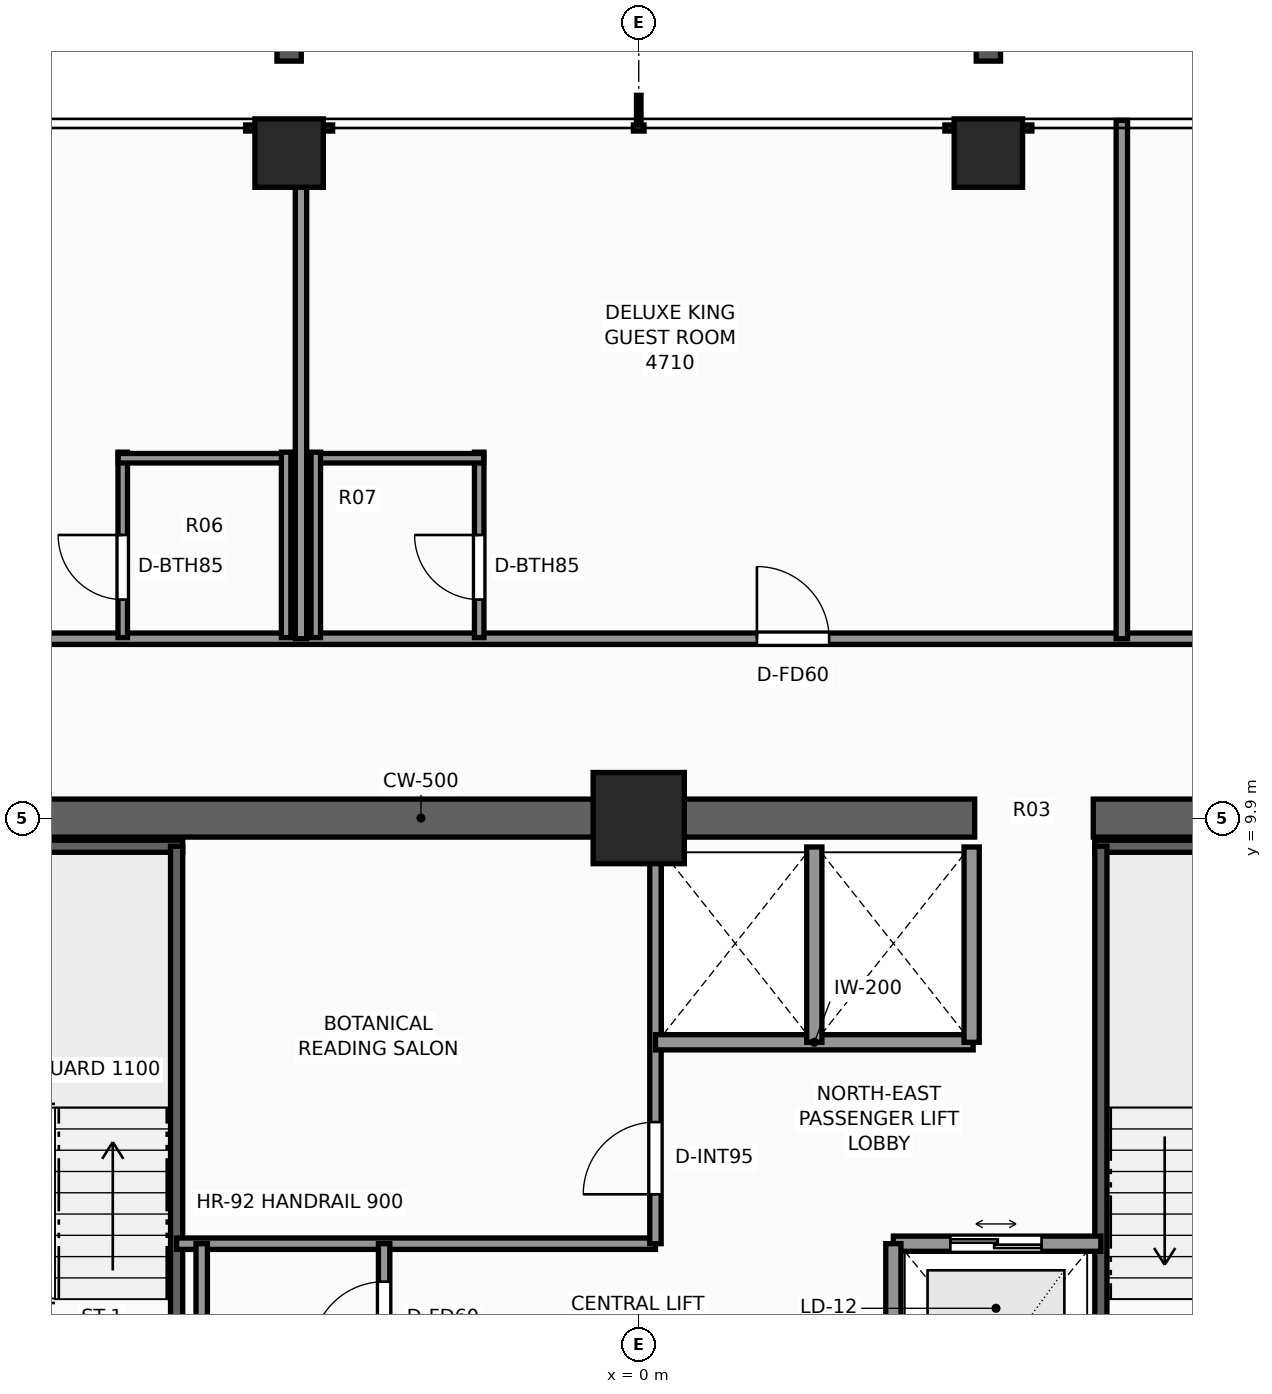
"""IFC4 building model, lengths in metres.
Left out: names, types, materials, properties, quantities, classifications, styles, units other than length and angle.
Written with IfcOpenShell. Run it as: python <this file> out.ifc"""

import sys

from ifc_helpers import new_model, si_unit, direction, frame, frame_2d, origin, origin_2d, place, context, subcontext, project, spatial, rectangle, extrude, element, fill, save


model = new_model("IFC4")
c1 = context("Model", 3, precision=1e-05, world=origin(), true_north=direction((0.0, 1.0)))
c2 = subcontext(c1, "Body", "Model", "MODEL_VIEW")
j1 = project(units=[si_unit("LENGTHUNIT", "METRE"), si_unit("PLANEANGLEUNIT", "RADIAN")], contexts=[c1])
p1 = place(None, origin())
s1 = spatial("IfcSite", under=j1, at=p1, CompositionType="ELEMENT")
p2 = place(p1, origin())
s2 = spatial("IfcBuilding", under=s1, at=p2, CompositionType="ELEMENT")
p3 = place(p2, frame((0.0, 0.0, 163.5)))
s3 = spatial("IfcBuildingStorey", under=s2, at=p3, CompositionType="ELEMENT", Elevation=163.5)
p4 = place(p3, frame((-10.15, 9.9, 0.0), z_axis=(0.0, 0.0, 1.0), x_axis=(1.0, 0.0, 0.0)))
e1 = element("IfcWall", 1, at=p4, inside=s3, PredefinedType="SHEAR", context=c2, shape_type="SweptSolid", body=[
    extrude(rectangle(XDim=14.57, YDim=0.5, at=frame_2d((7.285, 0.0))), origin(), (0.0, 0.0, 1.0), 3.3),
])
p5 = place(p3, frame((5.98, 9.9, 0.0), z_axis=(0.0, 0.0, 1.0), x_axis=(1.0, 0.0, 0.0)))
e2 = element("IfcWall", 2, at=p5, inside=s3, PredefinedType="SHEAR", context=c2, shape_type="SweptSolid", body=[
    extrude(rectangle(XDim=4.17, YDim=0.5, at=frame_2d((2.085, 0.0))), origin(), (0.0, 0.0, 1.0), 3.3),
])
p6 = place(p3, frame((0.0, 9.9, 0.0), z_axis=(0.0, 0.0, 1.0), x_axis=(1.0, 0.0, 0.0)))
e3 = element("IfcColumn", 3, at=p6, inside=s3, PredefinedType="COLUMN", context=c2, shape_type="SweptSolid", body=[
    extrude(rectangle(XDim=1.2, YDim=1.2, at=origin_2d()), origin(), (0.0, 0.0, 1.0), 3.3),
])
for number, where, z_axis, x_axis in (
    (4, (-4.6, 18.65, 0.0), (0.0, 0.0, 1.0), (1.0, 0.0, 0.0)),
    (5, (4.6, 18.65, 0.0), (0.0, 0.0, 1.0), (1.0, 0.0, 0.0)),
):
    element("IfcColumn", number, at=place(p3, frame(where, z_axis=z_axis, x_axis=x_axis)), inside=s3, PredefinedType="COLUMN", context=c2, shape_type="SweptSolid", body=[
        extrude(rectangle(XDim=0.9, YDim=0.9, at=origin_2d()), origin(), (0.0, 0.0, 1.0), 3.3),
    ])
p7 = place(p3, frame((-9.52, 9.53, 0.0), z_axis=(0.0, 0.0, 1.0), x_axis=(1.0, 0.0, 0.0)))
e6 = element("IfcWall", 6, at=p7, inside=s3, PredefinedType="SHEAR", context=c2, shape_type="SweptSolid", body=[
    extrude(rectangle(XDim=3.52, YDim=0.16, at=frame_2d((1.76, 0.0))), origin(), (0.0, 0.0, 1.0), 3.3),
])
p8 = place(p3, frame((-6.08, 1.97, 0.0), z_axis=(0.0, 0.0, 1.0), x_axis=(0.0, 1.0, 0.0)))
e7 = element("IfcWall", 7, at=p8, inside=s3, PredefinedType="SHEAR", context=c2, shape_type="SweptSolid", body=[
    extrude(rectangle(XDim=7.56, YDim=0.16, at=frame_2d((3.78, 0.0))), origin(), (0.0, 0.0, 1.0), 3.3),
])
p9 = place(p3, frame((6.0, 9.53, 0.0), z_axis=(0.0, 0.0, 1.0), x_axis=(1.0, 0.0, 0.0)))
e8 = element("IfcWall", 8, at=p9, inside=s3, PredefinedType="SHEAR", context=c2, shape_type="SweptSolid", body=[
    extrude(rectangle(XDim=3.52, YDim=0.16, at=frame_2d((1.76, 0.0))), origin(), (0.0, 0.0, 1.0), 3.3),
])
p10 = place(p3, frame((6.08, 1.97, 0.0), z_axis=(0.0, 0.0, 1.0), x_axis=(0.0, 1.0, 0.0)))
e9 = element("IfcWall", 9, at=p10, inside=s3, PredefinedType="SHEAR", context=c2, shape_type="SweptSolid", body=[
    extrude(rectangle(XDim=7.56, YDim=0.16, at=frame_2d((3.78, 0.0))), origin(), (0.0, 0.0, 1.0), 3.3),
])
p11 = place(p3, frame((3.35, 4.3, 0.0), z_axis=(0.0, 0.0, 1.0), x_axis=(1.0, 0.0, 0.0)))
e10 = element("IfcWall", 10, at=p11, inside=s3, PredefinedType="SOLIDWALL", context=c2, shape_type="SweptSolid", body=[
    extrude(rectangle(XDim=2.73, YDim=0.2, at=frame_2d((1.365, 0.0))), origin(), (0.0, 0.0, 1.0), 3.1),
])
p12 = place(p11, frame((0.75, 0.0, 0.0)))
e11 = element("IfcOpeningElement", 11, at=p12, cuts=e10, PredefinedType="OPENING", context=c2, shape_type="SweptSolid", body=[
    extrude(rectangle(XDim=1.2, YDim=2.25, at=frame_2d((0.6, 1.125))), frame((0.0, 0.11, 0.0), z_axis=(0.0, -1.0, 0.0), x_axis=(1.0, 0.0, 0.0)), (0.0, 0.0, 1.0), 0.22),
])
p13 = place(p3, frame((3.35, 1.1, 0.0), z_axis=(0.0, 0.0, 1.0), x_axis=(0.0, 1.0, 0.0)))
e12 = element("IfcWall", 12, at=p13, inside=s3, PredefinedType="SOLIDWALL", context=c2, shape_type="SweptSolid", body=[
    extrude(rectangle(XDim=3.2, YDim=0.2, at=frame_2d((1.6, 0.0))), origin(), (0.0, 0.0, 1.0), 2.735),
])
p14 = place(p3, frame((-6.08, 4.3, 0.0), z_axis=(0.0, 0.0, 1.0), x_axis=(1.0, 0.0, 0.0)))
e13 = element("IfcWall", 13, at=p14, inside=s3, PredefinedType="PARTITIONING", context=c2, shape_type="SweptSolid", body=[
    extrude(rectangle(XDim=6.3, YDim=0.15, at=frame_2d((3.15, 0.0))), origin(), (0.0, 0.0, 1.0), 3.1),
])
p15 = place(p3, frame((0.22, 4.3, 0.0), z_axis=(0.0, 0.0, 1.0), x_axis=(0.0, 1.0, 0.0)))
e14 = element("IfcWall", 14, at=p15, inside=s3, PredefinedType="PARTITIONING", context=c2, shape_type="SweptSolid", body=[
    extrude(rectangle(XDim=5.22, YDim=0.15, at=frame_2d((2.61, 0.0))), origin(), (0.0, 0.0, 1.0), 3.1),
])
p16 = place(p15, frame((0.65, 0.0, 0.0)))
e15 = element("IfcOpeningElement", 15, at=p16, cuts=e14, PredefinedType="OPENING", context=c2, shape_type="SweptSolid", body=[
    extrude(rectangle(XDim=0.95, YDim=2.06, at=frame_2d((0.475, 1.03))), frame((0.0, 0.085, 0.0), z_axis=(0.0, -1.0, 0.0), x_axis=(1.0, 0.0, 0.0)), (0.0, 0.0, 1.0), 0.17),
])
p17 = place(p3, frame((0.22, 6.95, 0.0), z_axis=(0.0, 0.0, 1.0), x_axis=(1.0, 0.0, 0.0)))
e16 = element("IfcWall", 16, at=p17, inside=s3, PredefinedType="SOLIDWALL", context=c2, shape_type="SweptSolid", body=[
    extrude(rectangle(XDim=4.18, YDim=0.2, at=frame_2d((2.09, 0.0))), origin(), (0.0, 0.0, 1.0), 3.1),
])
for number, where, z_axis, x_axis in (
    (17, (4.38, 6.95, 0.0), (0.0, 0.0, 1.0), (0.0, 1.0, 0.0)),
    (18, (2.31, 6.95, 0.0), (0.0, 0.0, 1.0), (0.0, 1.0, 0.0)),
):
    element("IfcWall", number, at=place(p3, frame(where, z_axis=z_axis, x_axis=x_axis)), inside=s3, PredefinedType="SOLIDWALL", context=c2, shape_type="SweptSolid", body=[
        extrude(rectangle(XDim=2.57, YDim=0.2, at=frame_2d((1.285, 0.0))), origin(), (0.0, 0.0, 1.0), 3.1),
    ])
p18 = place(p3, frame((-3.35, 1.1, 0.0), z_axis=(0.0, 0.0, 1.0), x_axis=(0.0, 1.0, 0.0)))
e19 = element("IfcWall", 19, at=p18, inside=s3, PredefinedType="PARTITIONING", context=c2, shape_type="SweptSolid", body=[
    extrude(rectangle(XDim=3.2, YDim=0.15, at=frame_2d((1.6, 0.0))), origin(), (0.0, 0.0, 1.0), 2.735),
])
p19 = place(p18, frame((1.75, 0.0, 0.0)))
e20 = element("IfcOpeningElement", 20, at=p19, cuts=e19, PredefinedType="OPENING", context=c2, shape_type="SweptSolid", body=[
    extrude(rectangle(XDim=0.95, YDim=2.06, at=frame_2d((0.475, 1.03))), frame((0.0, 0.085, 0.0), z_axis=(0.0, -1.0, 0.0), x_axis=(1.0, 0.0, 0.0)), (0.0, 0.0, 1.0), 0.17),
])
p20 = place(p3, frame((-5.75, 1.97, 0.0), z_axis=(0.0, 0.0, 1.0), x_axis=(0.0, 1.0, 0.0)))
e21 = element("IfcWall", 21, at=p20, inside=s3, PredefinedType="PARTITIONING", context=c2, shape_type="SweptSolid", body=[
    extrude(rectangle(XDim=2.33, YDim=0.15, at=frame_2d((1.165, 0.0))), origin(), (0.0, 0.0, 1.0), 2.735),
])
p21 = place(p3, frame((-12.42, 12.26, 0.0), z_axis=(0.0, 0.0, 1.0), x_axis=(1.0, 0.0, 0.0)))
e22 = element("IfcWall", 22, at=p21, inside=s3, PredefinedType="PARTITIONING", context=c2, shape_type="SweptSolid", body=[
    extrude(rectangle(XDim=24.84, YDim=0.15, at=frame_2d((12.42, 0.0))), origin(), (0.0, 0.0, 1.0), 2.389),
])
p22 = place(p21, frame((3.541, 0.0, 0.0)))
e23 = element("IfcOpeningElement", 23, at=p22, cuts=e22, PredefinedType="OPENING", context=c2, shape_type="SweptSolid", body=[
    extrude(rectangle(XDim=0.95, YDim=2.06, at=frame_2d((0.475, 1.03))), frame((0.0, 0.085, 0.0), z_axis=(0.0, -1.0, 0.0), x_axis=(1.0, 0.0, 0.0)), (0.0, 0.0, 1.0), 0.17),
])
p23 = place(p21, frame((13.975, 0.0, 0.0)))
e24 = element("IfcOpeningElement", 24, at=p23, cuts=e22, PredefinedType="OPENING", context=c2, shape_type="SweptSolid", body=[
    extrude(rectangle(XDim=0.95, YDim=2.06, at=frame_2d((0.475, 1.03))), frame((0.0, 0.085, 0.0), z_axis=(0.0, -1.0, 0.0), x_axis=(1.0, 0.0, 0.0)), (0.0, 0.0, 1.0), 0.17),
])
p24 = place(p21, frame((20.05, 0.0, 0.0)))
e25 = element("IfcOpeningElement", 25, at=p24, cuts=e22, PredefinedType="OPENING", context=c2, shape_type="SweptSolid", body=[
    extrude(rectangle(XDim=0.95, YDim=2.06, at=frame_2d((0.475, 1.03))), frame((0.0, 0.085, 0.0), z_axis=(0.0, -1.0, 0.0), x_axis=(1.0, 0.0, 0.0)), (0.0, 0.0, 1.0), 0.17),
])
p25 = place(p3, frame((-4.444, 12.26, 0.0), z_axis=(0.0, 0.0, 1.0), x_axis=(0.0, 1.0, 0.0)))
e26 = element("IfcWall", 26, at=p25, inside=s3, PredefinedType="PARTITIONING", context=c2, shape_type="SweptSolid", body=[
    extrude(rectangle(XDim=6.82, YDim=0.15, at=frame_2d((3.41, 0.0))), origin(), (0.0, 0.0, 1.0), 2.389),
])
p26 = place(p3, frame((-6.789, 12.275, 0.0), z_axis=(0.0, 0.0, 1.0), x_axis=(0.0, 1.0, 0.0)))
e27 = element("IfcWall", 27, at=p26, inside=s3, PredefinedType="PARTITIONING", context=c2, shape_type="SweptSolid", body=[
    extrude(rectangle(XDim=2.44, YDim=0.125, at=frame_2d((1.22, 0.0))), origin(), (0.0, 0.0, 1.0), 3.1),
])
p27 = place(p26, frame((0.5, 0.0, 0.0)))
e28 = element("IfcOpeningElement", 28, at=p27, cuts=e27, PredefinedType="OPENING", context=c2, shape_type="SweptSolid", body=[
    extrude(rectangle(XDim=0.85, YDim=2.03, at=frame_2d((0.425, 1.015))), frame((0.0, 0.073, 0.0), z_axis=(0.0, -1.0, 0.0), x_axis=(1.0, 0.0, 0.0)), (0.0, 0.0, 1.0), 0.145),
])
p28 = place(p3, frame((-6.849, 14.635, 0.0), z_axis=(0.0, 0.0, 1.0), x_axis=(1.0, 0.0, 0.0)))
e29 = element("IfcWall", 29, at=p28, inside=s3, PredefinedType="PARTITIONING", context=c2, shape_type="SweptSolid", body=[
    extrude(rectangle(XDim=2.27, YDim=0.125, at=frame_2d((1.135, 0.0))), origin(), (0.0, 0.0, 1.0), 2.389),
])
p29 = place(p3, frame((-4.639, 12.275, 0.0), z_axis=(0.0, 0.0, 1.0), x_axis=(0.0, 1.0, 0.0)))
e30 = element("IfcWall", 30, at=p29, inside=s3, PredefinedType="PARTITIONING", context=c2, shape_type="SweptSolid", body=[
    extrude(rectangle(XDim=2.44, YDim=0.125, at=frame_2d((1.22, 0.0))), origin(), (0.0, 0.0, 1.0), 2.389),
])
p30 = place(p3, frame((6.356, 12.26, 0.0), z_axis=(0.0, 0.0, 1.0), x_axis=(0.0, 1.0, 0.0)))
e31 = element("IfcWall", 31, at=p30, inside=s3, PredefinedType="PARTITIONING", context=c2, shape_type="SweptSolid", body=[
    extrude(rectangle(XDim=6.82, YDim=0.15, at=frame_2d((3.41, 0.0))), origin(), (0.0, 0.0, 1.0), 2.473),
])
p31 = place(p3, frame((-2.099, 12.275, 0.0), z_axis=(0.0, 0.0, 1.0), x_axis=(0.0, 1.0, 0.0)))
e32 = element("IfcWall", 32, at=p31, inside=s3, PredefinedType="PARTITIONING", context=c2, shape_type="SweptSolid", body=[
    extrude(rectangle(XDim=2.44, YDim=0.125, at=frame_2d((1.22, 0.0))), origin(), (0.0, 0.0, 1.0), 3.1),
])
p32 = place(p31, frame((0.5, 0.0, 0.0)))
e33 = element("IfcOpeningElement", 33, at=p32, cuts=e32, PredefinedType="OPENING", context=c2, shape_type="SweptSolid", body=[
    extrude(rectangle(XDim=0.85, YDim=2.03, at=frame_2d((0.425, 1.015))), frame((0.0, 0.073, 0.0), z_axis=(0.0, -1.0, 0.0), x_axis=(1.0, 0.0, 0.0)), (0.0, 0.0, 1.0), 0.145),
])
p33 = place(p3, frame((-4.309, 14.635, 0.0), z_axis=(0.0, 0.0, 1.0), x_axis=(1.0, 0.0, 0.0)))
e34 = element("IfcWall", 34, at=p33, inside=s3, PredefinedType="PARTITIONING", context=c2, shape_type="SweptSolid", body=[
    extrude(rectangle(XDim=2.27, YDim=0.125, at=frame_2d((1.135, 0.0))), origin(), (0.0, 0.0, 1.0), 2.389),
])
p34 = place(p3, frame((-4.249, 12.275, 0.0), z_axis=(0.0, 0.0, 1.0), x_axis=(0.0, 1.0, 0.0)))
e35 = element("IfcWall", 35, at=p34, inside=s3, PredefinedType="PARTITIONING", context=c2, shape_type="SweptSolid", body=[
    extrude(rectangle(XDim=2.44, YDim=0.125, at=frame_2d((1.22, 0.0))), origin(), (0.0, 0.0, 1.0), 3.1),
])
p35 = place(p12, origin())
e36 = element("IfcDoor", 36, at=p35, inside=s3, OperationType="DOUBLE_DOOR_SLIDING", PredefinedType="DOOR", context=c2, shape_type="SweptSolid", body=[
    extrude(rectangle(XDim=1.2, YDim=2.25, at=frame_2d((0.6, 1.125))), frame((0.0, 0.025, 0.0), z_axis=(0.0, -1.0, 0.0), x_axis=(1.0, 0.0, 0.0)), (0.0, 0.0, 1.0), 0.05),
])
fill(e11, e36)
p36 = place(p16, origin())
e37 = element("IfcDoor", 37, at=p36, inside=s3, OperationType="SINGLE_SWING_LEFT", PredefinedType="DOOR", context=c2, shape_type="SweptSolid", body=[
    extrude(rectangle(XDim=0.95, YDim=2.06, at=frame_2d((0.475, 1.03))), frame((0.0, 0.025, 0.0), z_axis=(0.0, -1.0, 0.0), x_axis=(1.0, 0.0, 0.0)), (0.0, 0.0, 1.0), 0.05),
])
fill(e15, e37)
p37 = place(p19, origin())
e38 = element("IfcDoor", 38, at=p37, inside=s3, OperationType="SINGLE_SWING_LEFT", PredefinedType="DOOR", context=c2, shape_type="SweptSolid", body=[
    extrude(rectangle(XDim=0.95, YDim=2.06, at=frame_2d((0.475, 1.03))), frame((0.0, 0.025, 0.0), z_axis=(0.0, -1.0, 0.0), x_axis=(1.0, 0.0, 0.0)), (0.0, 0.0, 1.0), 0.05),
])
fill(e20, e38)
p38 = place(p27, origin())
e39 = element("IfcDoor", 39, at=p38, inside=s3, OperationType="SINGLE_SWING_RIGHT", PredefinedType="DOOR", context=c2, shape_type="SweptSolid", body=[
    extrude(rectangle(XDim=0.85, YDim=2.03, at=frame_2d((0.425, 1.015))), frame((0.0, 0.025, 0.0), z_axis=(0.0, -1.0, 0.0), x_axis=(1.0, 0.0, 0.0)), (0.0, 0.0, 1.0), 0.05),
])
fill(e28, e39)
p39 = place(p32, origin())
e40 = element("IfcDoor", 40, at=p39, inside=s3, OperationType="SINGLE_SWING_RIGHT", PredefinedType="DOOR", context=c2, shape_type="SweptSolid", body=[
    extrude(rectangle(XDim=0.85, YDim=2.03, at=frame_2d((0.425, 1.015))), frame((0.0, 0.025, 0.0), z_axis=(0.0, -1.0, 0.0), x_axis=(1.0, 0.0, 0.0)), (0.0, 0.0, 1.0), 0.05),
])
fill(e33, e40)
p40 = place(p23, origin())
e41 = element("IfcDoor", 41, at=p40, inside=s3, OperationType="SINGLE_SWING_LEFT", PredefinedType="DOOR", context=c2, shape_type="SweptSolid", body=[
    extrude(rectangle(XDim=0.95, YDim=2.06, at=frame_2d((0.475, 1.03))), frame((0.0, 0.025, 0.0), z_axis=(0.0, -1.0, 0.0), x_axis=(1.0, 0.0, 0.0)), (0.0, 0.0, 1.0), 0.05),
])
fill(e24, e41)
save(model, sys.argv[1])
